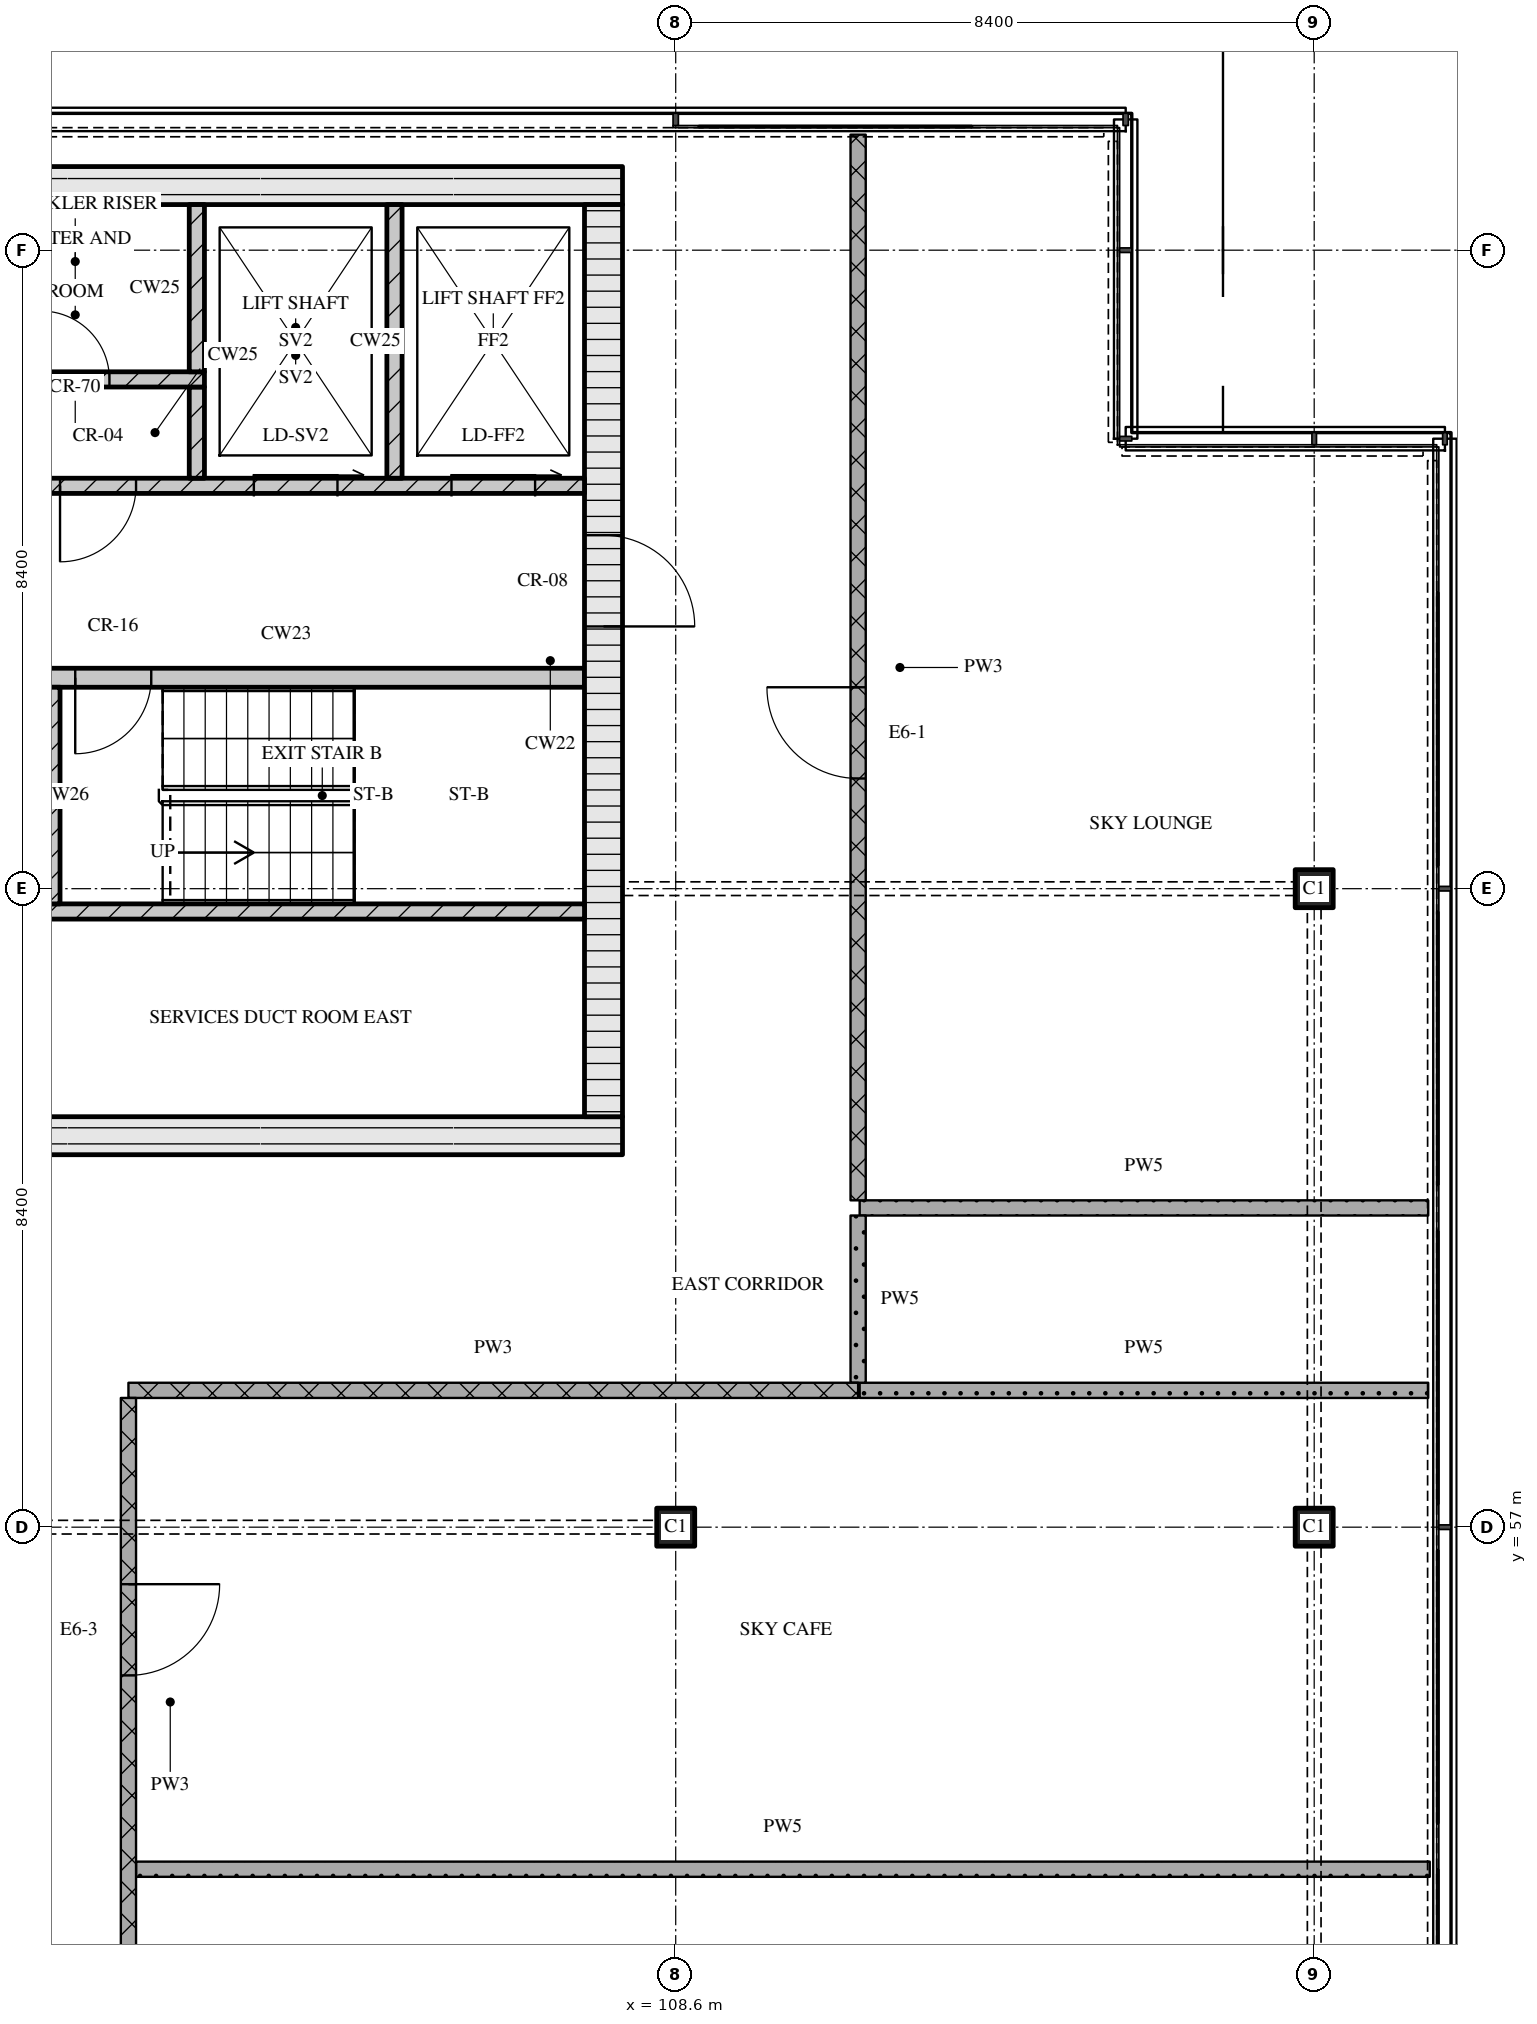
"""IFC4 building model, lengths in metres.
Left out: names, types, materials, properties, quantities, classifications, styles, units other than length and angle.
Written with IfcOpenShell. Run it as: python <this file> out.ifc"""

import sys

from ifc_helpers import new_model, si_unit, direction, frame, frame_2d, origin, origin_2d, place, context, subcontext, project, spatial, rectangle, extrude, element, fill, save


model = new_model("IFC4")
c1 = context("Model", 3, precision=1e-05, world=origin(), true_north=direction((0.0, 1.0)))
c2 = subcontext(c1, "Body", "Model", "MODEL_VIEW")
j1 = project(units=[si_unit("LENGTHUNIT", "METRE"), si_unit("PLANEANGLEUNIT", "RADIAN")], contexts=[c1])
p1 = place(None, origin())
s1 = spatial("IfcSite", under=j1, at=p1, CompositionType="ELEMENT")
p2 = place(p1, origin())
s2 = spatial("IfcBuilding", under=s1, at=p2, CompositionType="ELEMENT")
p3 = place(p2, frame((0.0, 0.0, 306.75)))
s3 = spatial("IfcBuildingStorey", under=s2, at=p3, CompositionType="ELEMENT", Elevation=306.75)
for number, where, z_axis, x_axis in (
    (1, (108.6, 57.0, 0.0), (0.0, 0.0, 1.0), (1.0, 0.0, 0.0)),
    (2, (117.0, 57.0, 0.0), (0.0, 0.0, 1.0), (1.0, 0.0, 0.0)),
    (3, (117.0, 65.4, 0.0), (0.0, 0.0, 1.0), (1.0, 0.0, 0.0)),
):
    element("IfcColumn", number, at=place(p3, frame(where, z_axis=z_axis, x_axis=x_axis)), inside=s3, PredefinedType="COLUMN", context=c2, shape_type="SweptSolid", body=[
        extrude(rectangle(XDim=0.5, YDim=0.5, at=origin_2d()), origin(), (0.0, 0.0, 1.0), 3.6),
    ])
p4 = place(p3, frame((67.3, 62.15, 0.0), z_axis=(0.0, 0.0, 1.0), x_axis=(1.0, 0.0, 0.0)))
e4 = element("IfcWall", 4, at=p4, inside=s3, PredefinedType="SOLIDWALL", context=c2, shape_type="SweptSolid", body=[
    extrude(rectangle(XDim=40.6, YDim=0.5, at=frame_2d((20.3, 0.0))), origin(), (0.0, 0.0, 1.0), 3.3),
])
p5 = place(p4, frame((20.65, 0.0, 0.0)))
e5 = element("IfcOpeningElement", 5, at=p5, cuts=e4, PredefinedType="OPENING", context=c2, shape_type="SweptSolid", body=[
    extrude(rectangle(XDim=1.8, YDim=2.1, at=frame_2d((0.9, 1.05))), frame((0.0, 0.26, 0.0), z_axis=(0.0, -1.0, 0.0), x_axis=(1.0, 0.0, 0.0)), (0.0, 0.0, 1.0), 0.52),
])
p6 = place(p3, frame((67.3, 74.65, 0.0), z_axis=(0.0, 0.0, 1.0), x_axis=(1.0, 0.0, 0.0)))
e6 = element("IfcWall", 6, at=p6, inside=s3, PredefinedType="SOLIDWALL", context=c2, shape_type="SweptSolid", body=[
    extrude(rectangle(XDim=40.6, YDim=0.5, at=frame_2d((20.3, 0.0))), origin(), (0.0, 0.0, 1.0), 3.3),
])
p7 = place(p3, frame((107.65, 62.4, 0.0), z_axis=(0.0, 0.0, 1.0), x_axis=(0.0, 1.0, 0.0)))
e7 = element("IfcWall", 7, at=p7, inside=s3, PredefinedType="SOLIDWALL", context=c2, shape_type="SweptSolid", body=[
    extrude(rectangle(XDim=12.0, YDim=0.5, at=frame_2d((6.0, 0.0))), origin(), (0.0, 0.0, 1.0), 3.3),
])
p8 = place(p7, frame((6.45, 0.0, 0.0)))
e8 = element("IfcOpeningElement", 8, at=p8, cuts=e7, PredefinedType="OPENING", context=c2, shape_type="SweptSolid", body=[
    extrude(rectangle(XDim=1.2, YDim=2.1, at=frame_2d((0.6, 1.05))), frame((0.0, 0.26, 0.0), z_axis=(0.0, -1.0, 0.0), x_axis=(1.0, 0.0, 0.0)), (0.0, 0.0, 1.0), 0.52),
])
p9 = place(p3, frame((91.4, 65.1, 0.0), z_axis=(0.0, 0.0, 1.0), x_axis=(1.0, 0.0, 0.0)))
e9 = element("IfcWall", 9, at=p9, inside=s3, PredefinedType="SOLIDWALL", context=c2, shape_type="SweptSolid", body=[
    extrude(rectangle(XDim=16.0, YDim=0.2, at=frame_2d((8.0, 0.0))), origin(), (0.0, 0.0, 1.0), 3.3),
])
p10 = place(p9, frame((0.85, 0.0, 0.0)))
e10 = element("IfcOpeningElement", 10, at=p10, cuts=e9, PredefinedType="OPENING", context=c2, shape_type="SweptSolid", body=[
    extrude(rectangle(XDim=1.1, YDim=2.1, at=frame_2d((0.55, 1.05))), frame((0.0, 0.11, 0.0), z_axis=(0.0, -1.0, 0.0), x_axis=(1.0, 0.0, 0.0)), (0.0, 0.0, 1.0), 0.22),
])
p11 = place(p9, frame((3.35, 0.0, 0.0)))
e11 = element("IfcOpeningElement", 11, at=p11, cuts=e9, PredefinedType="OPENING", context=c2, shape_type="SweptSolid", body=[
    extrude(rectangle(XDim=1.1, YDim=2.1, at=frame_2d((0.55, 1.05))), frame((0.0, 0.11, 0.0), z_axis=(0.0, -1.0, 0.0), x_axis=(1.0, 0.0, 0.0)), (0.0, 0.0, 1.0), 0.22),
])
p12 = place(p9, frame((5.85, 0.0, 0.0)))
e12 = element("IfcOpeningElement", 12, at=p12, cuts=e9, PredefinedType="OPENING", context=c2, shape_type="SweptSolid", body=[
    extrude(rectangle(XDim=1.1, YDim=2.1, at=frame_2d((0.55, 1.05))), frame((0.0, 0.11, 0.0), z_axis=(0.0, -1.0, 0.0), x_axis=(1.0, 0.0, 0.0)), (0.0, 0.0, 1.0), 0.22),
])
p13 = place(p9, frame((7.83, 0.0, 0.0)))
e13 = element("IfcOpeningElement", 13, at=p13, cuts=e9, PredefinedType="OPENING", context=c2, shape_type="SweptSolid", body=[
    extrude(rectangle(XDim=0.9, YDim=2.1, at=frame_2d((0.45, 1.05))), frame((0.0, 0.11, 0.0), z_axis=(0.0, -1.0, 0.0), x_axis=(1.0, 0.0, 0.0)), (0.0, 0.0, 1.0), 0.22),
])
p14 = place(p3, frame((100.35, 65.2, 0.0), z_axis=(0.0, 0.0, 1.0), x_axis=(0.0, 1.0, 0.0)))
e14 = element("IfcWall", 14, at=p14, inside=s3, PredefinedType="SOLIDWALL", context=c2, shape_type="SweptSolid", body=[
    extrude(rectangle(XDim=2.85, YDim=0.3, at=frame_2d((1.425, 0.0))), origin(), (0.0, 0.0, 1.0), 3.3),
])
p15 = place(p3, frame((98.95, 68.175, 0.0), z_axis=(0.0, 0.0, 1.0), x_axis=(1.0, 0.0, 0.0)))
e15 = element("IfcWall", 15, at=p15, inside=s3, PredefinedType="SOLIDWALL", context=c2, shape_type="SweptSolid", body=[
    extrude(rectangle(XDim=8.45, YDim=0.25, at=frame_2d((4.225, 0.0))), origin(), (0.0, 0.0, 1.0), 3.3),
])
p16 = place(p15, frame((0.45, 0.0, 0.0)))
e16 = element("IfcOpeningElement", 16, at=p16, cuts=e15, PredefinedType="OPENING", context=c2, shape_type="SweptSolid", body=[
    extrude(rectangle(XDim=0.8, YDim=2.1, at=frame_2d((0.4, 1.05))), frame((0.0, 0.135, 0.0), z_axis=(0.0, -1.0, 0.0), x_axis=(1.0, 0.0, 0.0)), (0.0, 0.0, 1.0), 0.27),
])
p17 = place(p15, frame((1.75, 0.0, 0.0)))
e17 = element("IfcOpeningElement", 17, at=p17, cuts=e15, PredefinedType="OPENING", context=c2, shape_type="SweptSolid", body=[
    extrude(rectangle(XDim=1.0, YDim=2.1, at=frame_2d((0.5, 1.05))), frame((0.0, 0.135, 0.0), z_axis=(0.0, -1.0, 0.0), x_axis=(1.0, 0.0, 0.0)), (0.0, 0.0, 1.0), 0.27),
])
p18 = place(p3, frame((67.8, 70.7, 0.0), z_axis=(0.0, 0.0, 1.0), x_axis=(1.0, 0.0, 0.0)))
e18 = element("IfcWall", 18, at=p18, inside=s3, PredefinedType="SOLIDWALL", context=c2, shape_type="SweptSolid", body=[
    extrude(rectangle(XDim=39.6, YDim=0.2, at=frame_2d((19.8, 0.0))), origin(), (0.0, 0.0, 1.0), 3.3),
])
p19 = place(p18, frame((0.65, 0.0, 0.0)))
e19 = element("IfcOpeningElement", 19, at=p19, cuts=e18, PredefinedType="OPENING", context=c2, shape_type="SweptSolid", body=[
    extrude(rectangle(XDim=1.1, YDim=2.1, at=frame_2d((0.55, 1.05))), frame((0.0, 0.11, 0.0), z_axis=(0.0, -1.0, 0.0), x_axis=(1.0, 0.0, 0.0)), (0.0, 0.0, 1.0), 0.22),
])
p20 = place(p18, frame((3.25, 0.0, 0.0)))
e20 = element("IfcOpeningElement", 20, at=p20, cuts=e18, PredefinedType="OPENING", context=c2, shape_type="SweptSolid", body=[
    extrude(rectangle(XDim=1.1, YDim=2.1, at=frame_2d((0.55, 1.05))), frame((0.0, 0.11, 0.0), z_axis=(0.0, -1.0, 0.0), x_axis=(1.0, 0.0, 0.0)), (0.0, 0.0, 1.0), 0.22),
])
p21 = place(p18, frame((5.9, 0.0, 0.0)))
e21 = element("IfcOpeningElement", 21, at=p21, cuts=e18, PredefinedType="OPENING", context=c2, shape_type="SweptSolid", body=[
    extrude(rectangle(XDim=1.0, YDim=2.1, at=frame_2d((0.5, 1.05))), frame((0.0, 0.11, 0.0), z_axis=(0.0, -1.0, 0.0), x_axis=(1.0, 0.0, 0.0)), (0.0, 0.0, 1.0), 0.22),
])
p22 = place(p18, frame((21.7, 0.0, 0.0)))
e22 = element("IfcOpeningElement", 22, at=p22, cuts=e18, PredefinedType="OPENING", context=c2, shape_type="SweptSolid", body=[
    extrude(rectangle(XDim=1.0, YDim=2.1, at=frame_2d((0.5, 1.05))), frame((0.0, 0.11, 0.0), z_axis=(0.0, -1.0, 0.0), x_axis=(1.0, 0.0, 0.0)), (0.0, 0.0, 1.0), 0.22),
])
p23 = place(p18, frame((32.7, 0.0, 0.0)))
e23 = element("IfcOpeningElement", 23, at=p23, cuts=e18, PredefinedType="OPENING", context=c2, shape_type="SweptSolid", body=[
    extrude(rectangle(XDim=1.0, YDim=2.1, at=frame_2d((0.5, 1.05))), frame((0.0, 0.11, 0.0), z_axis=(0.0, -1.0, 0.0), x_axis=(1.0, 0.0, 0.0)), (0.0, 0.0, 1.0), 0.22),
])
p24 = place(p18, frame((35.25, 0.0, 0.0)))
e24 = element("IfcOpeningElement", 24, at=p24, cuts=e18, PredefinedType="OPENING", context=c2, shape_type="SweptSolid", body=[
    extrude(rectangle(XDim=1.1, YDim=2.1, at=frame_2d((0.55, 1.05))), frame((0.0, 0.11, 0.0), z_axis=(0.0, -1.0, 0.0), x_axis=(1.0, 0.0, 0.0)), (0.0, 0.0, 1.0), 0.22),
])
p25 = place(p18, frame((37.85, 0.0, 0.0)))
e25 = element("IfcOpeningElement", 25, at=p25, cuts=e18, PredefinedType="OPENING", context=c2, shape_type="SweptSolid", body=[
    extrude(rectangle(XDim=1.1, YDim=2.1, at=frame_2d((0.55, 1.05))), frame((0.0, 0.11, 0.0), z_axis=(0.0, -1.0, 0.0), x_axis=(1.0, 0.0, 0.0)), (0.0, 0.0, 1.0), 0.22),
])
p26 = place(p3, frame((102.3, 70.8, 0.0), z_axis=(0.0, 0.0, 1.0), x_axis=(0.0, 1.0, 0.0)))
e26 = element("IfcWall", 26, at=p26, inside=s3, PredefinedType="SOLIDWALL", context=c2, shape_type="SweptSolid", body=[
    extrude(rectangle(XDim=1.2, YDim=0.2, at=frame_2d((0.6, 0.0))), origin(), (0.0, 0.0, 1.0), 3.3),
])
p27 = place(p3, frame((104.9, 70.8, 0.0), z_axis=(0.0, 0.0, 1.0), x_axis=(0.0, 1.0, 0.0)))
e27 = element("IfcWall", 27, at=p27, inside=s3, PredefinedType="SOLIDWALL", context=c2, shape_type="SweptSolid", body=[
    extrude(rectangle(XDim=3.6, YDim=0.2, at=frame_2d((1.8, 0.0))), origin(), (0.0, 0.0, 1.0), 3.3),
])
p28 = place(p3, frame((93.28, 72.1, 0.0), z_axis=(0.0, 0.0, 1.0), x_axis=(1.0, 0.0, 0.0)))
e28 = element("IfcWall", 28, at=p28, inside=s3, PredefinedType="SOLIDWALL", context=c2, shape_type="SweptSolid", body=[
    extrude(rectangle(XDim=9.12, YDim=0.2, at=frame_2d((4.56, 0.0))), origin(), (0.0, 0.0, 1.0), 3.3),
])
p29 = place(p28, frame((0.87, 0.0, 0.0)))
e29 = element("IfcOpeningElement", 29, at=p29, cuts=e28, PredefinedType="OPENING", context=c2, shape_type="SweptSolid", body=[
    extrude(rectangle(XDim=0.9, YDim=2.1, at=frame_2d((0.45, 1.05))), frame((0.0, 0.11, 0.0), z_axis=(0.0, -1.0, 0.0), x_axis=(1.0, 0.0, 0.0)), (0.0, 0.0, 1.0), 0.22),
])
p30 = place(p28, frame((3.73, 0.0, 0.0)))
e30 = element("IfcOpeningElement", 30, at=p30, cuts=e28, PredefinedType="OPENING", context=c2, shape_type="SweptSolid", body=[
    extrude(rectangle(XDim=0.9, YDim=2.1, at=frame_2d((0.45, 1.05))), frame((0.0, 0.11, 0.0), z_axis=(0.0, -1.0, 0.0), x_axis=(1.0, 0.0, 0.0)), (0.0, 0.0, 1.0), 0.22),
])
p31 = place(p28, frame((6.97, 0.0, 0.0)))
e31 = element("IfcOpeningElement", 31, at=p31, cuts=e28, PredefinedType="OPENING", context=c2, shape_type="SweptSolid", body=[
    extrude(rectangle(XDim=0.9, YDim=2.1, at=frame_2d((0.45, 1.05))), frame((0.0, 0.11, 0.0), z_axis=(0.0, -1.0, 0.0), x_axis=(1.0, 0.0, 0.0)), (0.0, 0.0, 1.0), 0.22),
])
p32 = place(p3, frame((102.3, 72.2, 0.0), z_axis=(0.0, 0.0, 1.0), x_axis=(0.0, 1.0, 0.0)))
e32 = element("IfcWall", 32, at=p32, inside=s3, PredefinedType="SOLIDWALL", context=c2, shape_type="SweptSolid", body=[
    extrude(rectangle(XDim=2.2, YDim=0.2, at=frame_2d((1.1, 0.0))), origin(), (0.0, 0.0, 1.0), 3.3),
])
p33 = place(p3, frame((101.5, 52.5, 0.0), z_axis=(0.0, 0.0, 1.0), x_axis=(1.0, 0.0, 0.0)))
e33 = element("IfcWall", 33, at=p33, inside=s3, PredefinedType="PARTITIONING", context=c2, shape_type="SweptSolid", body=[
    extrude(rectangle(XDim=17.02, YDim=0.2, at=frame_2d((8.51, 0.0))), origin(), (0.0, 0.0, 1.0), 3.3),
])
p34 = place(p3, frame((101.4, 58.8, 0.0), z_axis=(0.0, 0.0, 1.0), x_axis=(1.0, 0.0, 0.0)))
e34 = element("IfcWall", 34, at=p34, inside=s3, PredefinedType="PARTITIONING", context=c2, shape_type="SweptSolid", body=[
    extrude(rectangle(XDim=9.6, YDim=0.2, at=frame_2d((4.8, 0.0))), origin(), (0.0, 0.0, 1.0), 3.3),
])
for number, where, z_axis, x_axis in (
    (35, (111.02, 58.8, 0.0), (0.0, 0.0, 1.0), (1.0, 0.0, 0.0)),
    (36, (111.02, 61.2, 0.0), (0.0, 0.0, 1.0), (1.0, 0.0, 0.0)),
):
    element("IfcWall", number, at=place(p3, frame(where, z_axis=z_axis, x_axis=x_axis)), inside=s3, PredefinedType="PARTITIONING", context=c2, shape_type="SweptSolid", body=[
        extrude(rectangle(XDim=7.48, YDim=0.2, at=frame_2d((3.74, 0.0))), origin(), (0.0, 0.0, 1.0), 3.3),
    ])
p35 = place(p3, frame((101.4, 58.7, 0.0), z_axis=(0.0, 0.0, 1.0), x_axis=(0.0, -1.0, 0.0)))
e37 = element("IfcWall", 37, at=p35, inside=s3, PredefinedType="PARTITIONING", context=c2, shape_type="SweptSolid", body=[
    extrude(rectangle(XDim=8.0, YDim=0.2, at=frame_2d((4.0, 0.0))), origin(), (0.0, 0.0, 1.0), 3.3),
])
p36 = place(p35, frame((2.45, 0.0, 0.0)))
e38 = element("IfcOpeningElement", 38, at=p36, cuts=e37, PredefinedType="OPENING", context=c2, shape_type="SweptSolid", body=[
    extrude(rectangle(XDim=1.2, YDim=2.1, at=frame_2d((0.6, 1.05))), frame((0.0, 0.11, 0.0), z_axis=(0.0, -1.0, 0.0), x_axis=(1.0, 0.0, 0.0)), (0.0, 0.0, 1.0), 0.22),
])
p37 = place(p3, frame((111.0, 75.32, 0.0), z_axis=(0.0, 0.0, 1.0), x_axis=(0.0, -1.0, 0.0)))
e39 = element("IfcWall", 39, at=p37, inside=s3, PredefinedType="PARTITIONING", context=c2, shape_type="SweptSolid", body=[
    extrude(rectangle(XDim=14.02, YDim=0.2, at=frame_2d((7.01, 0.0))), origin(), (0.0, 0.0, 1.0), 3.3),
])
p38 = place(p37, frame((7.27, 0.0, 0.0)))
e40 = element("IfcOpeningElement", 40, at=p38, cuts=e39, PredefinedType="OPENING", context=c2, shape_type="SweptSolid", body=[
    extrude(rectangle(XDim=1.2, YDim=2.1, at=frame_2d((0.6, 1.05))), frame((0.0, 0.11, 0.0), z_axis=(0.0, -1.0, 0.0), x_axis=(1.0, 0.0, 0.0)), (0.0, 0.0, 1.0), 0.22),
])
p39 = place(p3, frame((111.0, 61.1, 0.0), z_axis=(0.0, 0.0, 1.0), x_axis=(0.0, -1.0, 0.0)))
e41 = element("IfcWall", 41, at=p39, inside=s3, PredefinedType="PARTITIONING", context=c2, shape_type="SweptSolid", body=[
    extrude(rectangle(XDim=2.2, YDim=0.2, at=frame_2d((1.1, 0.0))), origin(), (0.0, 0.0, 1.0), 3.3),
])
p40 = place(p17, origin())
e42 = element("IfcDoor", 42, at=p40, inside=s3, OperationType="SINGLE_SWING_RIGHT", PredefinedType="DOOR", context=c2, shape_type="SweptSolid", body=[
    extrude(rectangle(XDim=1.0, YDim=2.1, at=frame_2d((0.5, 1.05))), frame((0.0, 0.025, 0.0), z_axis=(0.0, -1.0, 0.0), x_axis=(1.0, 0.0, 0.0)), (0.0, 0.0, 1.0), 0.05),
])
fill(e17, e42)
p41 = place(p8, origin())
e43 = element("IfcDoor", 43, at=p41, inside=s3, OperationType="SINGLE_SWING_RIGHT", PredefinedType="DOOR", context=c2, shape_type="SweptSolid", body=[
    extrude(rectangle(XDim=1.2, YDim=2.1, at=frame_2d((0.6, 1.05))), frame((0.0, 0.025, 0.0), z_axis=(0.0, -1.0, 0.0), x_axis=(1.0, 0.0, 0.0)), (0.0, 0.0, 1.0), 0.05),
])
fill(e8, e43)
p42 = place(p23, origin())
e44 = element("IfcDoor", 44, at=p42, inside=s3, OperationType="SINGLE_SWING_RIGHT", PredefinedType="DOOR", context=c2, shape_type="SweptSolid", body=[
    extrude(rectangle(XDim=1.0, YDim=2.1, at=frame_2d((0.5, 1.05))), frame((0.0, 0.025, 0.0), z_axis=(0.0, -1.0, 0.0), x_axis=(1.0, 0.0, 0.0)), (0.0, 0.0, 1.0), 0.05),
])
fill(e23, e44)
p43 = place(p24, origin())
e45 = element("IfcDoor", 45, at=p43, inside=s3, OperationType="SLIDING_TO_RIGHT", PredefinedType="DOOR", context=c2, shape_type="SweptSolid", body=[
    extrude(rectangle(XDim=1.1, YDim=2.1, at=frame_2d((0.55, 1.05))), frame((0.0, 0.025, 0.0), z_axis=(0.0, -1.0, 0.0), x_axis=(1.0, 0.0, 0.0)), (0.0, 0.0, 1.0), 0.05),
])
fill(e24, e45)
p44 = place(p25, origin())
e46 = element("IfcDoor", 46, at=p44, inside=s3, OperationType="SLIDING_TO_RIGHT", PredefinedType="DOOR", context=c2, shape_type="SweptSolid", body=[
    extrude(rectangle(XDim=1.1, YDim=2.1, at=frame_2d((0.55, 1.05))), frame((0.0, 0.025, 0.0), z_axis=(0.0, -1.0, 0.0), x_axis=(1.0, 0.0, 0.0)), (0.0, 0.0, 1.0), 0.05),
])
fill(e25, e46)
p45 = place(p31, origin())
e47 = element("IfcDoor", 47, at=p45, inside=s3, OperationType="SINGLE_SWING_LEFT", PredefinedType="DOOR", context=c2, shape_type="SweptSolid", body=[
    extrude(rectangle(XDim=0.9, YDim=2.1, at=frame_2d((0.45, 1.05))), frame((0.0, 0.025, 0.0), z_axis=(0.0, -1.0, 0.0), x_axis=(1.0, 0.0, 0.0)), (0.0, 0.0, 1.0), 0.05),
])
fill(e31, e47)
p46 = place(p36, origin())
e48 = element("IfcDoor", 48, at=p46, inside=s3, OperationType="SINGLE_SWING_LEFT", PredefinedType="DOOR", context=c2, shape_type="SweptSolid", body=[
    extrude(rectangle(XDim=1.2, YDim=2.1, at=frame_2d((0.6, 1.05))), frame((0.0, 0.025, 0.0), z_axis=(0.0, -1.0, 0.0), x_axis=(1.0, 0.0, 0.0)), (0.0, 0.0, 1.0), 0.05),
])
fill(e38, e48)
p47 = place(p38, origin())
e49 = element("IfcDoor", 49, at=p47, inside=s3, OperationType="SINGLE_SWING_RIGHT", PredefinedType="DOOR", context=c2, shape_type="SweptSolid", body=[
    extrude(rectangle(XDim=1.2, YDim=2.1, at=frame_2d((0.6, 1.05))), frame((0.0, 0.025, 0.0), z_axis=(0.0, -1.0, 0.0), x_axis=(1.0, 0.0, 0.0)), (0.0, 0.0, 1.0), 0.05),
])
fill(e40, e49)
save(model, sys.argv[1])
